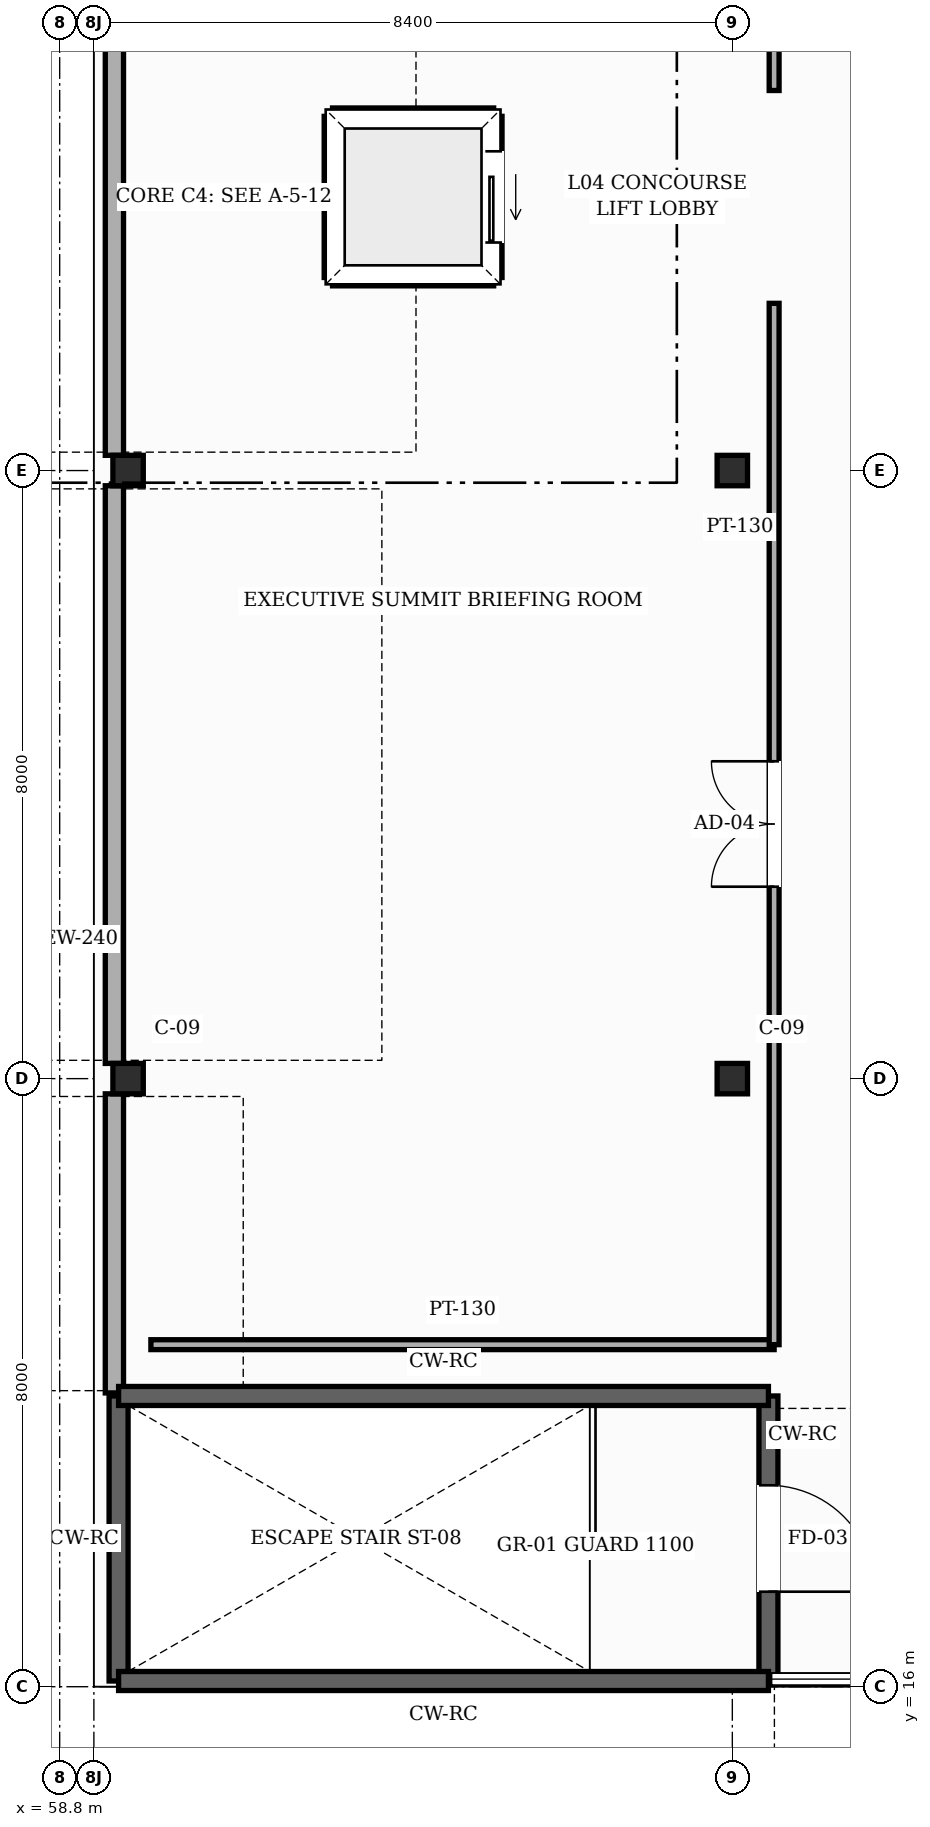
"""IFC4 building model, lengths in metres.
Left out: names, types, materials, properties, quantities, classifications, styles, units other than length and angle.
Written with IfcOpenShell. Run it as: python <this file> out.ifc"""

import sys

from ifc_helpers import new_model, si_unit, direction, frame, frame_2d, origin, origin_2d, place, context, subcontext, project, spatial, rectangle, i_section, extrude, element, fill, save


model = new_model("IFC4")
c1 = context("Model", 3, precision=1e-05, world=origin(), true_north=direction((0.0, 1.0)))
c2 = subcontext(c1, "Body", "Model", "MODEL_VIEW")
j1 = project(units=[si_unit("LENGTHUNIT", "METRE"), si_unit("PLANEANGLEUNIT", "RADIAN")], contexts=[c1])
p1 = place(None, origin())
s1 = spatial("IfcSite", under=j1, at=p1, CompositionType="ELEMENT")
p2 = place(p1, origin())
s2 = spatial("IfcBuilding", under=s1, at=p2, CompositionType="ELEMENT")
p3 = place(p2, frame((0.0, 0.0, 19.8)))
s3 = spatial("IfcBuildingStorey", under=s2, at=p3, CompositionType="ELEMENT", Elevation=19.8)
for number, where, z_axis, x_axis in (
    (1, (59.7, 24.0, 0.0), (0.0, 0.0, 1.0), (1.0, 0.0, 0.0)),
    (2, (59.7, 32.0, 0.0), (0.0, 0.0, 1.0), (1.0, 0.0, 0.0)),
    (3, (67.65, 24.0, 0.0), (0.0, 0.0, 1.0), (1.0, 0.0, 0.0)),
    (4, (67.65, 32.0, 0.0), (0.0, 0.0, 1.0), (1.0, 0.0, 0.0)),
):
    element("IfcColumn", number, at=place(p3, frame(where, z_axis=z_axis, x_axis=x_axis)), inside=s3, PredefinedType="COLUMN", context=c2, shape_type="SweptSolid", body=[
        extrude(i_section(OverallWidth=0.4, OverallDepth=0.4, WebThickness=0.013, FlangeThickness=0.021, FilletRadius=0.022, at=origin_2d()), origin(), (0.0, 0.0, 1.0), 4.58),
    ])
p4 = place(p3, frame((59.52, 19.865, 0.0), z_axis=(0.0, 0.0, 1.0), x_axis=(0.0, 1.0, 0.0)))
e5 = element("IfcWall", 5, at=p4, inside=s3, PredefinedType="SOLIDWALL", context=c2, shape_type="SweptSolid", body=[
    extrude(rectangle(XDim=3.935, YDim=0.24, at=frame_2d((1.968, 0.0))), origin(), (0.0, 0.0, 1.0), 4.565),
])
p5 = place(p3, frame((59.52, 24.2, 0.0), z_axis=(0.0, 0.0, 1.0), x_axis=(0.0, 1.0, 0.0)))
e6 = element("IfcWall", 6, at=p5, inside=s3, PredefinedType="SOLIDWALL", context=c2, shape_type="SweptSolid", body=[
    extrude(rectangle(XDim=7.6, YDim=0.24, at=frame_2d((3.8, 0.0))), origin(), (0.0, 0.0, 1.0), 3.905),
])
p6 = place(p3, frame((59.52, 32.2, 0.0), z_axis=(0.0, 0.0, 1.0), x_axis=(0.0, 1.0, 0.0)))
e7 = element("IfcWall", 7, at=p6, inside=s3, PredefinedType="SOLIDWALL", context=c2, shape_type="SweptSolid", body=[
    extrude(rectangle(XDim=8.5, YDim=0.24, at=frame_2d((4.25, 0.0))), origin(), (0.0, 0.0, 1.0), 3.905),
])
p7 = place(p3, frame((68.125, 19.825, 0.0), z_axis=(0.0, 0.0, 1.0), x_axis=(0.0, -1.0, 0.0)))
e8 = element("IfcWall", 8, at=p7, inside=s3, PredefinedType="SHEAR", context=c2, shape_type="SweptSolid", body=[
    extrude(rectangle(XDim=3.75, YDim=0.25, at=frame_2d((1.875, 0.0))), origin(), (0.0, 0.0, 1.0), 4.58),
])
p8 = place(p7, frame((1.175, 0.0, 0.0)))
e9 = element("IfcOpeningElement", 9, at=p8, cuts=e8, PredefinedType="OPENING", context=c2, shape_type="SweptSolid", body=[
    extrude(rectangle(XDim=1.4, YDim=2.25, at=frame_2d((0.7, 1.125))), frame((0.0, 0.135, 0.0), z_axis=(0.0, -1.0, 0.0), x_axis=(1.0, 0.0, 0.0)), (0.0, 0.0, 1.0), 0.27),
])
p9 = place(p3, frame((59.575, 16.075, 0.0), z_axis=(0.0, 0.0, 1.0), x_axis=(0.0, 1.0, 0.0)))
e10 = element("IfcWall", 10, at=p9, inside=s3, PredefinedType="SHEAR", context=c2, shape_type="SweptSolid", body=[
    extrude(rectangle(XDim=3.75, YDim=0.25, at=frame_2d((1.875, 0.0))), origin(), (0.0, 0.0, 1.0), 4.58),
])
for number, where, z_axis, x_axis in (
    (11, (59.575, 19.825, 0.0), (0.0, 0.0, 1.0), (1.0, 0.0, 0.0)),
    (12, (68.125, 16.075, 0.0), (0.0, 0.0, 1.0), (-1.0, 0.0, 0.0)),
):
    element("IfcWall", number, at=place(p3, frame(where, z_axis=z_axis, x_axis=x_axis)), inside=s3, PredefinedType="SHEAR", context=c2, shape_type="SweptSolid", body=[
        extrude(rectangle(XDim=8.55, YDim=0.25, at=frame_2d((4.275, 0.0))), origin(), (0.0, 0.0, 1.0), 4.58),
    ])
for number, where, z_axis, x_axis in (
    (13, (62.39, 36.66, 0.0), (0.0, 0.0, 1.0), (1.0, 0.0, 0.0)),
    (14, (62.39, 34.54, 0.0), (0.0, 0.0, 1.0), (1.0, 0.0, 0.0)),
):
    element("IfcWall", number, at=place(p3, frame(where, z_axis=z_axis, x_axis=x_axis)), inside=s3, PredefinedType="SHEAR", context=c2, shape_type="SweptSolid", body=[
        extrude(rectangle(XDim=2.12, YDim=0.22, at=frame_2d((1.06, 0.0))), origin(), (0.0, 0.0, 1.0), 4.58),
    ])
p10 = place(p3, frame((64.51, 34.54, 0.0), z_axis=(0.0, 0.0, 1.0), x_axis=(0.0, 1.0, 0.0)))
e15 = element("IfcWall", 15, at=p10, inside=s3, PredefinedType="SHEAR", context=c2, shape_type="SweptSolid", body=[
    extrude(rectangle(XDim=2.12, YDim=0.22, at=frame_2d((1.06, 0.0))), origin(), (0.0, 0.0, 1.0), 4.58),
])
p11 = place(p10, frame((0.46, 0.0, 0.0)))
e16 = element("IfcOpeningElement", 16, at=p11, cuts=e15, PredefinedType="OPENING", context=c2, shape_type="SweptSolid", body=[
    extrude(rectangle(XDim=1.2, YDim=2.25, at=frame_2d((0.6, 1.125))), frame((0.0, 0.12, 0.0), z_axis=(0.0, -1.0, 0.0), x_axis=(1.0, 0.0, 0.0)), (0.0, 0.0, 1.0), 0.24),
])
p12 = place(p3, frame((62.39, 34.54, 0.0), z_axis=(0.0, 0.0, 1.0), x_axis=(0.0, 1.0, 0.0)))
e17 = element("IfcWall", 17, at=p12, inside=s3, PredefinedType="SHEAR", context=c2, shape_type="SweptSolid", body=[
    extrude(rectangle(XDim=2.12, YDim=0.22, at=frame_2d((1.06, 0.0))), origin(), (0.0, 0.0, 1.0), 4.58),
])
p13 = place(p3, frame((60.0, 20.5, 0.0), z_axis=(0.0, 0.0, 1.0), x_axis=(1.0, 0.0, 0.0)))
e18 = element("IfcWall", 18, at=p13, inside=s3, PredefinedType="PARTITIONING", context=c2, shape_type="SweptSolid", body=[
    extrude(rectangle(XDim=8.2, YDim=0.13, at=frame_2d((4.1, 0.0))), origin(), (0.0, 0.0, 1.0), 4.565),
])
p14 = place(p3, frame((68.2, 20.5, 0.0), z_axis=(0.0, 0.0, 1.0), x_axis=(0.0, 1.0, 0.0)))
e19 = element("IfcWall", 19, at=p14, inside=s3, PredefinedType="PARTITIONING", context=c2, shape_type="SweptSolid", body=[
    extrude(rectangle(XDim=13.7, YDim=0.13, at=frame_2d((6.85, 0.0))), origin(), (0.0, 0.0, 1.0), 4.565),
])
p15 = place(p14, frame((6.025, 0.0, 0.0)))
e20 = element("IfcOpeningElement", 20, at=p15, cuts=e19, PredefinedType="OPENING", context=c2, shape_type="SweptSolid", body=[
    extrude(rectangle(XDim=1.65, YDim=2.35, at=frame_2d((0.825, 1.175))), frame((0.0, 0.075, 0.0), z_axis=(0.0, -1.0, 0.0), x_axis=(1.0, 0.0, 0.0)), (0.0, 0.0, 1.0), 0.15),
])
p16 = place(p3, frame((68.2, 37.0, 0.0), z_axis=(0.0, 0.0, 1.0), x_axis=(0.0, 1.0, 0.0)))
e21 = element("IfcWall", 21, at=p16, inside=s3, PredefinedType="PARTITIONING", context=c2, shape_type="SweptSolid", body=[
    extrude(rectangle(XDim=18.8, YDim=0.13, at=frame_2d((9.4, 0.0))), origin(), (0.0, 0.0, 1.0), 4.565),
])
p17 = place(p16, frame((8.65, 0.0, 0.0)))
e22 = element("IfcOpeningElement", 22, at=p17, cuts=e21, PredefinedType="OPENING", context=c2, shape_type="SweptSolid", body=[
    extrude(rectangle(XDim=1.5, YDim=2.3, at=frame_2d((0.75, 1.15))), frame((0.0, 0.075, 0.0), z_axis=(0.0, -1.0, 0.0), x_axis=(1.0, 0.0, 0.0)), (0.0, 0.0, 1.0), 0.15),
])
p18 = place(p8, origin())
e23 = element("IfcDoor", 23, at=p18, inside=s3, OperationType="SINGLE_SWING_RIGHT", PredefinedType="DOOR", context=c2, shape_type="SweptSolid", body=[
    extrude(rectangle(XDim=1.4, YDim=2.25, at=frame_2d((0.7, 1.125))), frame((0.0, 0.025, 0.0), z_axis=(0.0, -1.0, 0.0), x_axis=(1.0, 0.0, 0.0)), (0.0, 0.0, 1.0), 0.05),
])
fill(e9, e23)
p19 = place(p11, origin())
e24 = element("IfcDoor", 24, at=p19, inside=s3, OperationType="SLIDING_TO_LEFT", PredefinedType="DOOR", context=c2, shape_type="SweptSolid", body=[
    extrude(rectangle(XDim=1.2, YDim=2.25, at=frame_2d((0.6, 1.125))), frame((0.0, 0.025, 0.0), z_axis=(0.0, -1.0, 0.0), x_axis=(1.0, 0.0, 0.0)), (0.0, 0.0, 1.0), 0.05),
])
fill(e16, e24)
p20 = place(p15, origin())
e25 = element("IfcDoor", 25, at=p20, inside=s3, OperationType="DOUBLE_DOOR_SINGLE_SWING", PredefinedType="DOOR", context=c2, shape_type="SweptSolid", body=[
    extrude(rectangle(XDim=1.65, YDim=2.35, at=frame_2d((0.825, 1.175))), frame((0.0, 0.025, 0.0), z_axis=(0.0, -1.0, 0.0), x_axis=(1.0, 0.0, 0.0)), (0.0, 0.0, 1.0), 0.05),
])
fill(e20, e25)
save(model, sys.argv[1])
